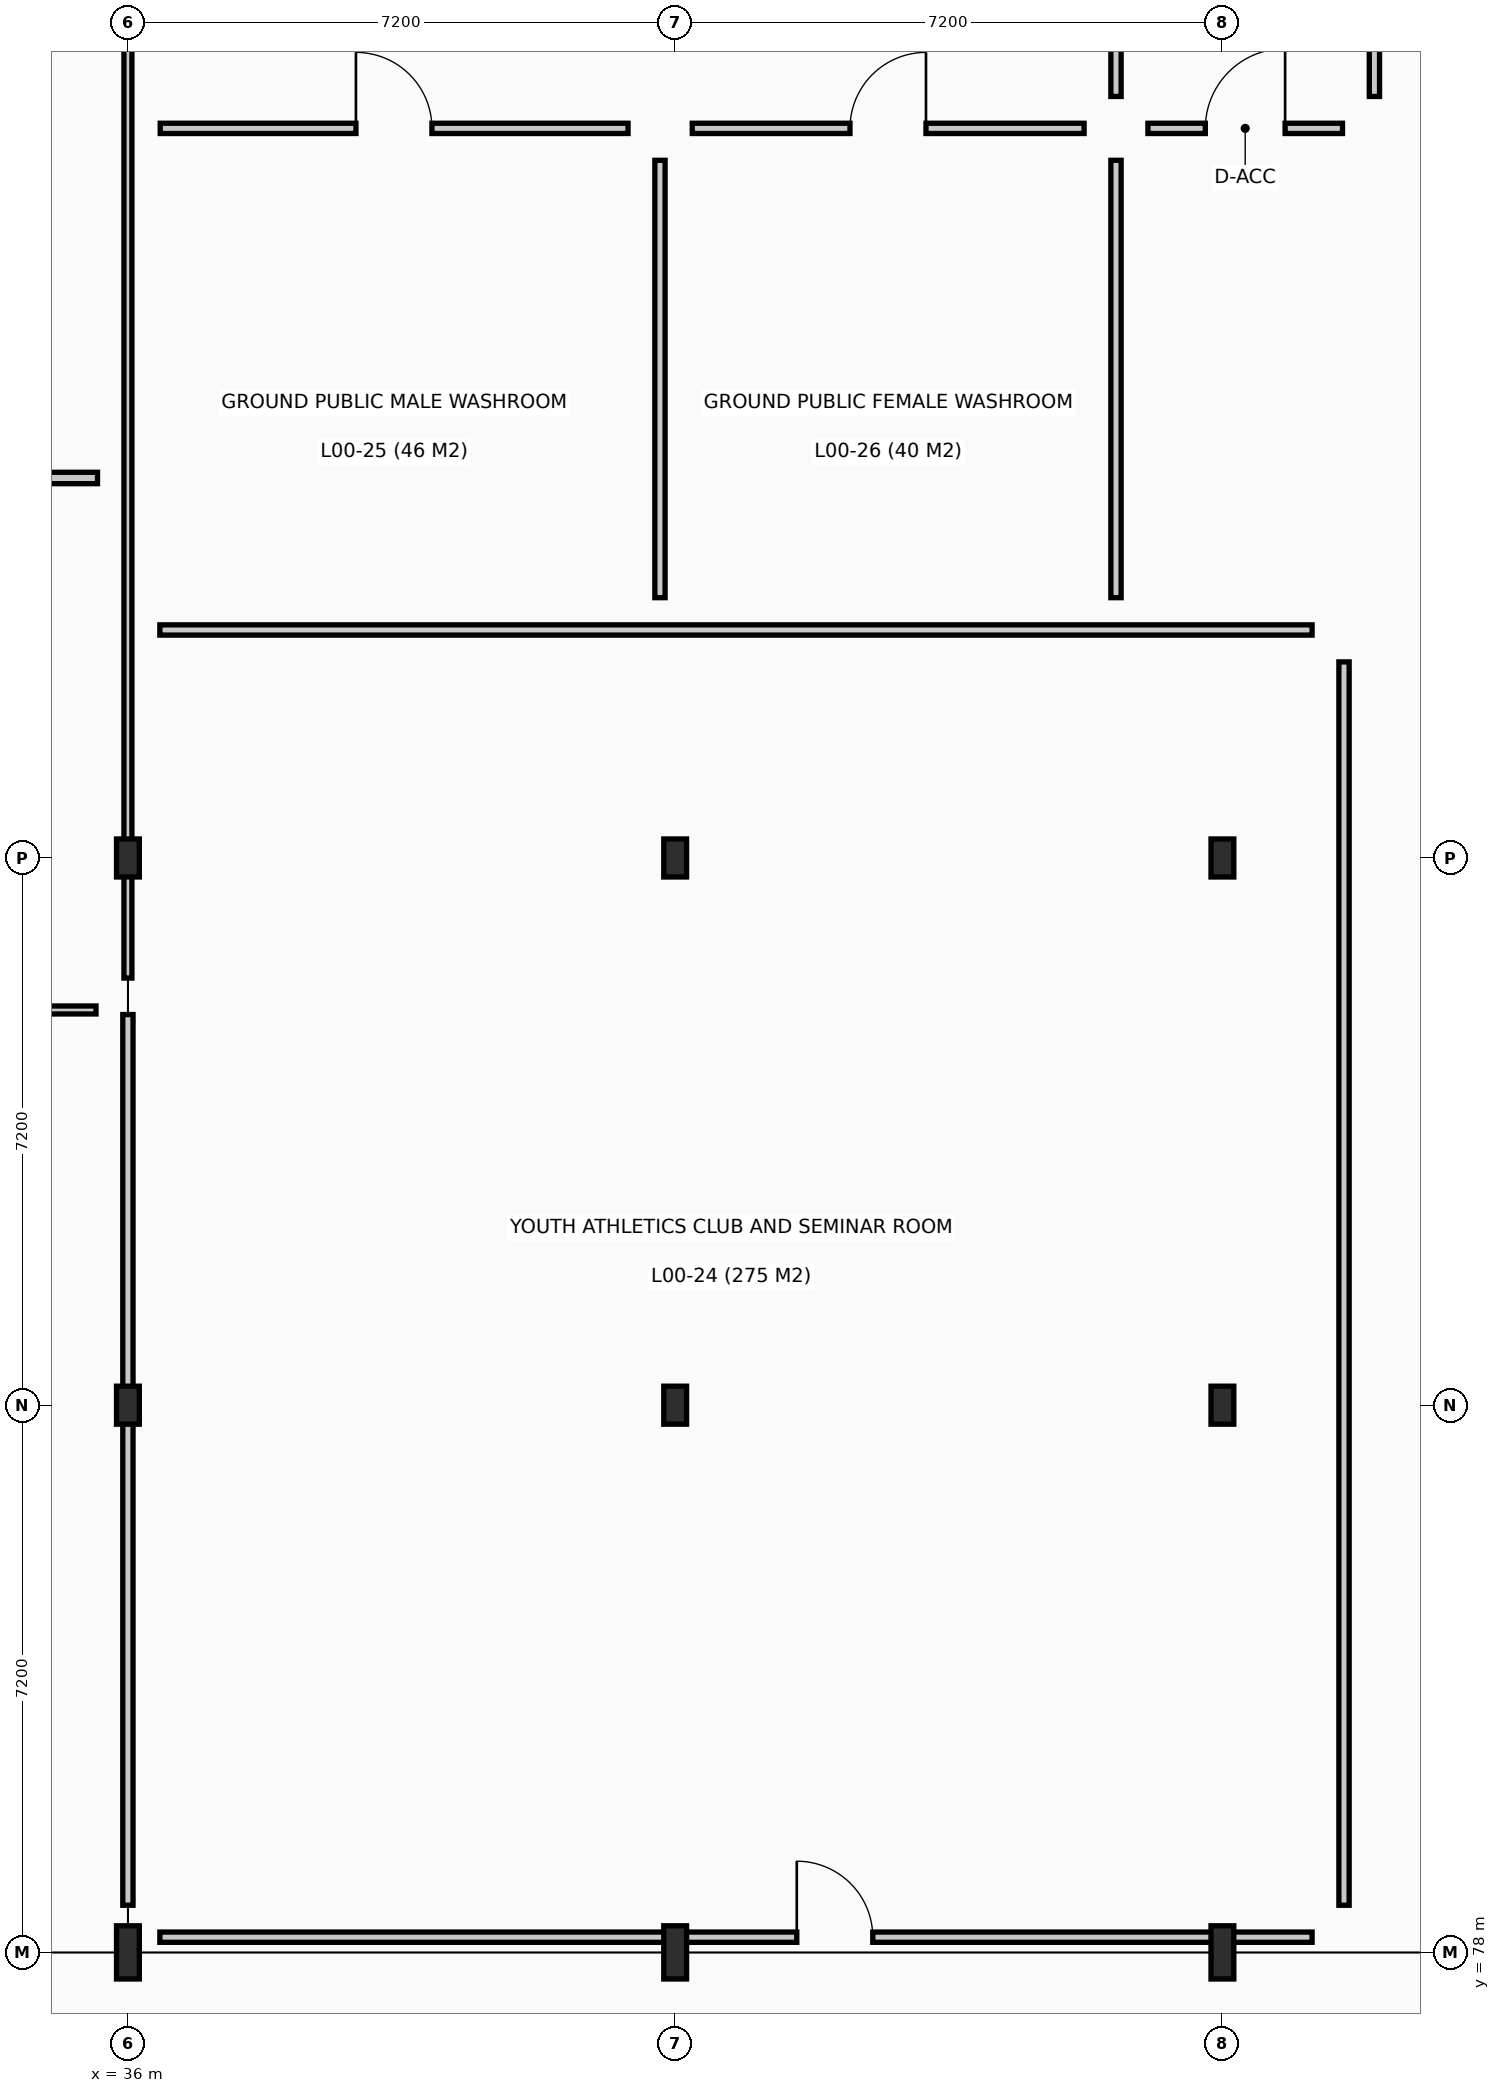
"""IFC4 building model, lengths in metres.
Left out: names, types, materials, properties, quantities, classifications, styles, units other than length and angle.
Written with IfcOpenShell. Run it as: python <this file> out.ifc"""

import sys

from ifc_helpers import new_model, si_unit, direction, frame, frame_2d, origin, origin_2d, place, context, subcontext, project, spatial, rectangle, i_section, extrude, element, fill, save


model = new_model("IFC4")
c1 = context("Model", 3, precision=1e-05, world=origin(), true_north=direction((0.0, 1.0)))
c2 = subcontext(c1, "Body", "Model", "MODEL_VIEW")
j1 = project(units=[si_unit("LENGTHUNIT", "METRE"), si_unit("PLANEANGLEUNIT", "RADIAN")], contexts=[c1])
p1 = place(None, origin())
s1 = spatial("IfcSite", under=j1, at=p1, CompositionType="ELEMENT")
p2 = place(p1, origin())
s2 = spatial("IfcBuilding", under=s1, at=p2, CompositionType="ELEMENT")
p3 = place(p2, origin())
s3 = spatial("IfcBuildingStorey", under=s2, at=p3, CompositionType="ELEMENT", Elevation=0.0)
p4 = place(p3, frame((36.0, 78.0, 0.0), z_axis=(0.0, 0.0, 1.0), x_axis=(1.0, 0.0, 0.0)))
e1 = element("IfcColumn", 1, at=p4, inside=s3, PredefinedType="COLUMN", context=c2, shape_type="SweptSolid", body=[
    extrude(i_section(OverallWidth=0.3, OverallDepth=0.7, WebThickness=0.017, FlangeThickness=0.032, at=origin_2d()), origin(), (0.0, 0.0, 1.0), 4.8),
])
for number, where, z_axis, x_axis in (
    (2, (36.0, 85.2, 0.0), (0.0, 0.0, 1.0), (1.0, 0.0, 0.0)),
    (3, (36.0, 92.4, 0.0), (0.0, 0.0, 1.0), (1.0, 0.0, 0.0)),
):
    element("IfcColumn", number, at=place(p3, frame(where, z_axis=z_axis, x_axis=x_axis)), inside=s3, PredefinedType="COLUMN", context=c2, shape_type="SweptSolid", body=[
        extrude(i_section(OverallWidth=0.3, OverallDepth=0.5, WebThickness=0.014, FlangeThickness=0.028, at=origin_2d()), origin(), (0.0, 0.0, 1.0), 4.8),
    ])
p5 = place(p3, frame((43.2, 78.0, 0.0), z_axis=(0.0, 0.0, 1.0), x_axis=(1.0, 0.0, 0.0)))
e4 = element("IfcColumn", 4, at=p5, inside=s3, PredefinedType="COLUMN", context=c2, shape_type="SweptSolid", body=[
    extrude(i_section(OverallWidth=0.3, OverallDepth=0.7, WebThickness=0.017, FlangeThickness=0.032, at=origin_2d()), origin(), (0.0, 0.0, 1.0), 4.8),
])
for number, where, z_axis, x_axis in (
    (5, (43.2, 85.2, 0.0), (0.0, 0.0, 1.0), (1.0, 0.0, 0.0)),
    (6, (43.2, 92.4, 0.0), (0.0, 0.0, 1.0), (1.0, 0.0, 0.0)),
):
    element("IfcColumn", number, at=place(p3, frame(where, z_axis=z_axis, x_axis=x_axis)), inside=s3, PredefinedType="COLUMN", context=c2, shape_type="SweptSolid", body=[
        extrude(i_section(OverallWidth=0.3, OverallDepth=0.5, WebThickness=0.014, FlangeThickness=0.028, at=origin_2d()), origin(), (0.0, 0.0, 1.0), 4.8),
    ])
p6 = place(p3, frame((50.4, 78.0, 0.0), z_axis=(0.0, 0.0, 1.0), x_axis=(1.0, 0.0, 0.0)))
e7 = element("IfcColumn", 7, at=p6, inside=s3, PredefinedType="COLUMN", context=c2, shape_type="SweptSolid", body=[
    extrude(i_section(OverallWidth=0.3, OverallDepth=0.7, WebThickness=0.017, FlangeThickness=0.032, at=origin_2d()), origin(), (0.0, 0.0, 1.0), 4.8),
])
for number, where, z_axis, x_axis in (
    (8, (50.4, 85.2, 0.0), (0.0, 0.0, 1.0), (1.0, 0.0, 0.0)),
    (9, (50.4, 92.4, 0.0), (0.0, 0.0, 1.0), (1.0, 0.0, 0.0)),
):
    element("IfcColumn", number, at=place(p3, frame(where, z_axis=z_axis, x_axis=x_axis)), inside=s3, PredefinedType="COLUMN", context=c2, shape_type="SweptSolid", body=[
        extrude(i_section(OverallWidth=0.3, OverallDepth=0.5, WebThickness=0.014, FlangeThickness=0.028, at=origin_2d()), origin(), (0.0, 0.0, 1.0), 4.8),
    ])
p7 = place(p3, frame((7.82, 90.4, 0.0), z_axis=(0.0, 0.0, 1.0), x_axis=(1.0, 0.0, 0.0)))
e10 = element("IfcWall", 10, at=p7, inside=s3, PredefinedType="PARTITIONING", context=c2, shape_type="SweptSolid", body=[
    extrude(rectangle(XDim=27.76, YDim=0.105, at=frame_2d((13.88, 0.0))), origin(), (0.0, 0.0, 1.0), 4.565),
])
p8 = place(p7, frame((13.405, 0.0, 0.0)))
e11 = element("IfcOpeningElement", 11, at=p8, cuts=e10, PredefinedType="OPENING", context=c2, shape_type="SweptSolid", body=[
    extrude(rectangle(XDim=0.95, YDim=2.1, at=frame_2d((0.475, 1.05))), frame((0.0, 0.062, 0.0), z_axis=(0.0, -1.0, 0.0), x_axis=(1.0, 0.0, 0.0)), (0.0, 0.0, 1.0), 0.125),
])
p9 = place(p3, frame((36.0, 90.82, 0.0), z_axis=(0.0, 0.0, 1.0), x_axis=(0.0, 1.0, 0.0)))
e12 = element("IfcWall", 12, at=p9, inside=s3, PredefinedType="PARTITIONING", context=c2, shape_type="SweptSolid", body=[
    extrude(rectangle(XDim=18.76, YDim=0.105, at=frame_2d((9.38, 0.0))), origin(), (0.0, 0.0, 1.0), 3.91),
])
p10 = place(p3, frame((36.42, 78.2, 0.0), z_axis=(0.0, 0.0, 1.0), x_axis=(1.0, 0.0, 0.0)))
e13 = element("IfcWall", 13, at=p10, inside=s3, PredefinedType="PARTITIONING", context=c2, shape_type="SweptSolid", body=[
    extrude(rectangle(XDim=15.16, YDim=0.135, at=frame_2d((7.58, 0.0))), origin(), (0.0, 0.0, 1.0), 4.06),
])
p11 = place(p10, frame((8.38, 0.0, 0.0)))
e14 = element("IfcOpeningElement", 14, at=p11, cuts=e13, PredefinedType="OPENING", context=c2, shape_type="SweptSolid", body=[
    extrude(rectangle(XDim=1.0, YDim=2.1, at=frame_2d((0.5, 1.05))), frame((0.0, 0.077, 0.0), z_axis=(0.0, -1.0, 0.0), x_axis=(1.0, 0.0, 0.0)), (0.0, 0.0, 1.0), 0.155),
])
p12 = place(p3, frame((36.42, 95.4, 0.0), z_axis=(0.0, 0.0, 1.0), x_axis=(1.0, 0.0, 0.0)))
e15 = element("IfcWall", 15, at=p12, inside=s3, PredefinedType="PARTITIONING", context=c2, shape_type="SweptSolid", body=[
    extrude(rectangle(XDim=15.16, YDim=0.135, at=frame_2d((7.58, 0.0))), origin(), (0.0, 0.0, 1.0), 4.565),
])
p13 = place(p3, frame((36.0, 78.62, 0.0), z_axis=(0.0, 0.0, 1.0), x_axis=(0.0, 1.0, 0.0)))
e16 = element("IfcWall", 16, at=p13, inside=s3, PredefinedType="PARTITIONING", context=c2, shape_type="SweptSolid", body=[
    extrude(rectangle(XDim=11.72, YDim=0.135, at=frame_2d((5.86, 0.0))), origin(), (0.0, 0.0, 1.0), 4.11),
])
p14 = place(p3, frame((52.0, 78.62, 0.0), z_axis=(0.0, 0.0, 1.0), x_axis=(0.0, 1.0, 0.0)))
e17 = element("IfcWall", 17, at=p14, inside=s3, PredefinedType="PARTITIONING", context=c2, shape_type="SweptSolid", body=[
    extrude(rectangle(XDim=16.36, YDim=0.135, at=frame_2d((8.18, 0.0))), origin(), (0.0, 0.0, 1.0), 4.565),
])
p15 = place(p3, frame((36.425, 102.0, 0.0), z_axis=(0.0, 0.0, 1.0), x_axis=(1.0, 0.0, 0.0)))
e18 = element("IfcWall", 18, at=p15, inside=s3, PredefinedType="PARTITIONING", context=c2, shape_type="SweptSolid", body=[
    extrude(rectangle(XDim=6.155, YDim=0.135, at=frame_2d((3.078, 0.0))), origin(), (0.0, 0.0, 1.0), 4.565),
])
p16 = place(p15, frame((2.575, 0.0, 0.0)))
e19 = element("IfcOpeningElement", 19, at=p16, cuts=e18, PredefinedType="OPENING", context=c2, shape_type="SweptSolid", body=[
    extrude(rectangle(XDim=1.0, YDim=2.1, at=frame_2d((0.5, 1.05))), frame((0.0, 0.077, 0.0), z_axis=(0.0, -1.0, 0.0), x_axis=(1.0, 0.0, 0.0)), (0.0, 0.0, 1.0), 0.155),
])
p17 = place(p3, frame((43.0, 95.825, 0.0), z_axis=(0.0, 0.0, 1.0), x_axis=(0.0, 1.0, 0.0)))
e20 = element("IfcWall", 20, at=p17, inside=s3, PredefinedType="PARTITIONING", context=c2, shape_type="SweptSolid", body=[
    extrude(rectangle(XDim=5.755, YDim=0.135, at=frame_2d((2.877, 0.0))), origin(), (0.0, 0.0, 1.0), 3.91),
])
p18 = place(p3, frame((43.425, 102.0, 0.0), z_axis=(0.0, 0.0, 1.0), x_axis=(1.0, 0.0, 0.0)))
e21 = element("IfcWall", 21, at=p18, inside=s3, PredefinedType="PARTITIONING", context=c2, shape_type="SweptSolid", body=[
    extrude(rectangle(XDim=5.155, YDim=0.135, at=frame_2d((2.578, 0.0))), origin(), (0.0, 0.0, 1.0), 4.565),
])
p19 = place(p18, frame((2.075, 0.0, 0.0)))
e22 = element("IfcOpeningElement", 22, at=p19, cuts=e21, PredefinedType="OPENING", context=c2, shape_type="SweptSolid", body=[
    extrude(rectangle(XDim=1.0, YDim=2.1, at=frame_2d((0.5, 1.05))), frame((0.0, 0.077, 0.0), z_axis=(0.0, -1.0, 0.0), x_axis=(1.0, 0.0, 0.0)), (0.0, 0.0, 1.0), 0.155),
])
p20 = place(p3, frame((49.0, 95.825, 0.0), z_axis=(0.0, 0.0, 1.0), x_axis=(0.0, 1.0, 0.0)))
e23 = element("IfcWall", 23, at=p20, inside=s3, PredefinedType="PARTITIONING", context=c2, shape_type="SweptSolid", body=[
    extrude(rectangle(XDim=5.755, YDim=0.135, at=frame_2d((2.877, 0.0))), origin(), (0.0, 0.0, 1.0), 4.565),
])
p21 = place(p3, frame((49.42, 102.0, 0.0), z_axis=(0.0, 0.0, 1.0), x_axis=(1.0, 0.0, 0.0)))
e24 = element("IfcWall", 24, at=p21, inside=s3, PredefinedType="PARTITIONING", context=c2, shape_type="SweptSolid", body=[
    extrude(rectangle(XDim=2.56, YDim=0.135, at=frame_2d((1.28, 0.0))), origin(), (0.0, 0.0, 1.0), 4.565),
])
p22 = place(p21, frame((0.755, 0.0, 0.0)))
e25 = element("IfcOpeningElement", 25, at=p22, cuts=e24, PredefinedType="OPENING", context=c2, shape_type="SweptSolid", body=[
    extrude(rectangle(XDim=1.05, YDim=2.15, at=frame_2d((0.525, 1.075))), frame((0.0, 0.077, 0.0), z_axis=(0.0, -1.0, 0.0), x_axis=(1.0, 0.0, 0.0)), (0.0, 0.0, 1.0), 0.155),
])
for number, where, z_axis, x_axis in (
    (26, (49.0, 102.42, 0.0), (0.0, 0.0, 1.0), (0.0, 1.0, 0.0)),
    (27, (52.4, 102.42, 0.0), (0.0, 0.0, 1.0), (0.0, 1.0, 0.0)),
):
    element("IfcWall", number, at=place(p3, frame(where, z_axis=z_axis, x_axis=x_axis)), inside=s3, PredefinedType="PARTITIONING", context=c2, shape_type="SweptSolid", body=[
        extrude(rectangle(XDim=2.56, YDim=0.135, at=frame_2d((1.28, 0.0))), origin(), (0.0, 0.0, 1.0), 4.565),
    ])
p23 = place(p3, frame((29.6, 97.4, 0.0), z_axis=(0.0, 0.0, 1.0), x_axis=(1.0, 0.0, 0.0)))
e28 = element("IfcWall", 28, at=p23, inside=s3, PredefinedType="MOVABLE", context=c2, shape_type="SweptSolid", body=[
    extrude(rectangle(XDim=6.0, YDim=0.15, at=frame_2d((3.0, 0.0))), origin(), (0.0, 0.0, 1.0), 4.285),
])
p24 = place(p16, frame((1.0, 0.0, 0.0), z_axis=(0.0, 0.0, 1.0), x_axis=(-1.0, 0.0, 0.0)))
e29 = element("IfcDoor", 29, at=p24, inside=s3, OperationType="SINGLE_SWING_RIGHT", PredefinedType="DOOR", context=c2, shape_type="SweptSolid", body=[
    extrude(rectangle(XDim=1.0, YDim=2.1, at=frame_2d((0.5, 1.05))), frame((0.0, 0.025, 0.0), z_axis=(0.0, -1.0, 0.0), x_axis=(1.0, 0.0, 0.0)), (0.0, 0.0, 1.0), 0.05),
])
fill(e19, e29)
p25 = place(p19, frame((1.0, 0.0, 0.0), z_axis=(0.0, 0.0, 1.0), x_axis=(-1.0, 0.0, 0.0)))
e30 = element("IfcDoor", 30, at=p25, inside=s3, OperationType="SINGLE_SWING_LEFT", PredefinedType="DOOR", context=c2, shape_type="SweptSolid", body=[
    extrude(rectangle(XDim=1.0, YDim=2.1, at=frame_2d((0.5, 1.05))), frame((0.0, 0.025, 0.0), z_axis=(0.0, -1.0, 0.0), x_axis=(1.0, 0.0, 0.0)), (0.0, 0.0, 1.0), 0.05),
])
fill(e22, e30)
p26 = place(p11, origin())
e31 = element("IfcDoor", 31, at=p26, inside=s3, OperationType="SINGLE_SWING_LEFT", PredefinedType="DOOR", context=c2, shape_type="SweptSolid", body=[
    extrude(rectangle(XDim=1.0, YDim=2.1, at=frame_2d((0.5, 1.05))), frame((0.0, 0.025, 0.0), z_axis=(0.0, -1.0, 0.0), x_axis=(1.0, 0.0, 0.0)), (0.0, 0.0, 1.0), 0.05),
])
fill(e14, e31)
p27 = place(p22, origin())
e32 = element("IfcDoor", 32, at=p27, inside=s3, OperationType="SINGLE_SWING_RIGHT", PredefinedType="DOOR", context=c2, shape_type="SweptSolid", body=[
    extrude(rectangle(XDim=1.05, YDim=2.15, at=frame_2d((0.525, 1.075))), frame((0.0, 0.025, 0.0), z_axis=(0.0, -1.0, 0.0), x_axis=(1.0, 0.0, 0.0)), (0.0, 0.0, 1.0), 0.05),
])
fill(e25, e32)
save(model, sys.argv[1])
